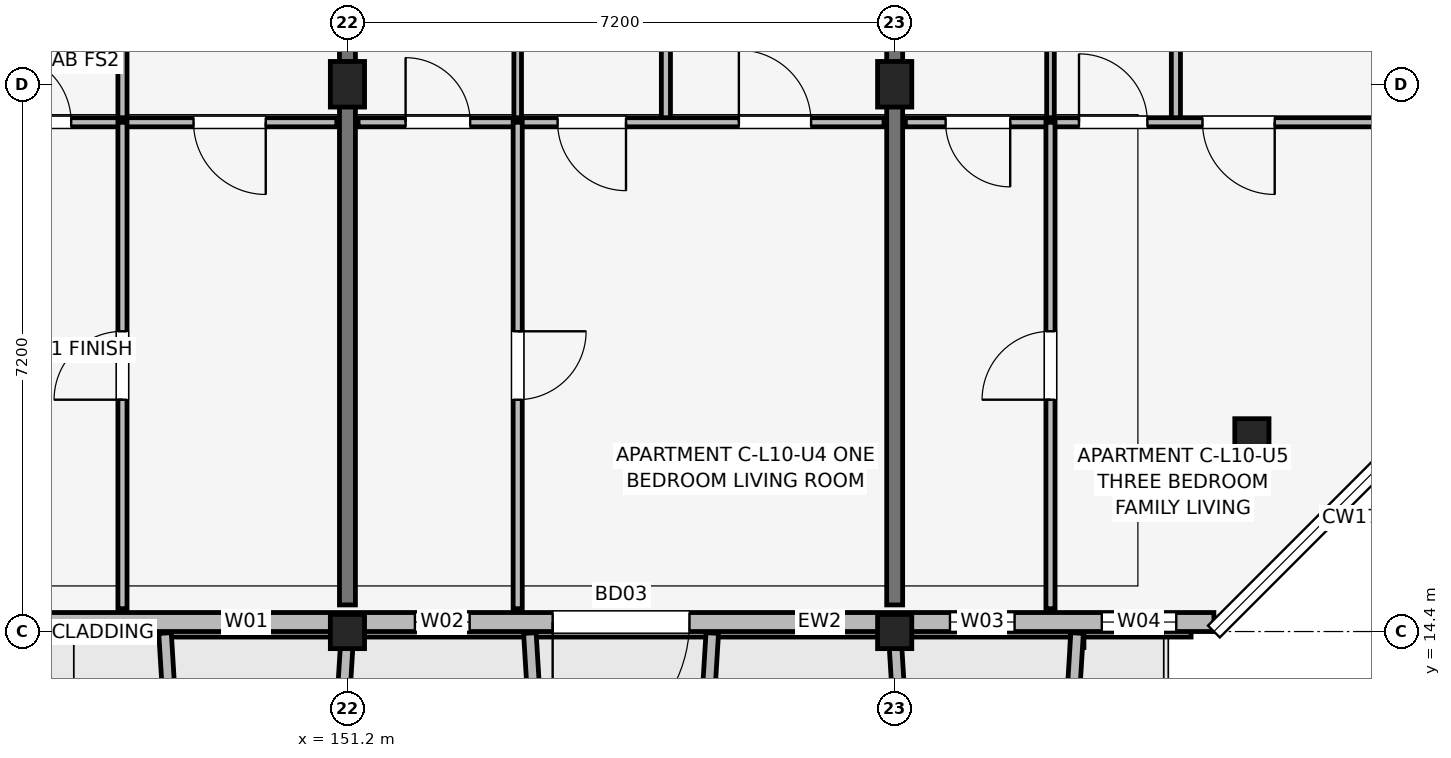
"""IFC4 building model, lengths in metres.
Left out: names, types, materials, properties, quantities, classifications, styles, units other than length and angle.
Written with IfcOpenShell. Run it as: python <this file> out.ifc"""

import sys

from ifc_helpers import new_model, si_unit, direction, frame, frame_2d, origin, origin_2d, place, context, subcontext, project, spatial, rectangle, extrude, element, fill, save


model = new_model("IFC4")
c1 = context("Model", 3, precision=1e-05, world=origin(), true_north=direction((0.0, 1.0)))
c2 = subcontext(c1, "Body", "Model", "MODEL_VIEW")
j1 = project(units=[si_unit("LENGTHUNIT", "METRE"), si_unit("PLANEANGLEUNIT", "RADIAN")], contexts=[c1])
p1 = place(None, origin())
s1 = spatial("IfcSite", under=j1, at=p1, CompositionType="ELEMENT")
p2 = place(p1, origin())
s2 = spatial("IfcBuilding", under=s1, at=p2, CompositionType="ELEMENT")
p3 = place(p2, frame((0.0, 0.0, 33.9)))
s3 = spatial("IfcBuildingStorey", under=s2, at=p3, CompositionType="ELEMENT", Elevation=33.9)
p4 = place(p3, frame((151.2, 14.4, 0.0), z_axis=(0.0, 0.0, 1.0), x_axis=(1.0, 0.0, 0.0)))
e1 = element("IfcColumn", 1, at=p4, inside=s3, PredefinedType="COLUMN", context=c2, shape_type="SweptSolid", body=[
    extrude(rectangle(XDim=0.45, YDim=0.45, at=origin_2d()), origin(), (0.0, 0.0, 1.0), 3.15),
])
p5 = place(p3, frame((151.2, 21.6, 0.0), z_axis=(0.0, 0.0, 1.0), x_axis=(1.0, 0.0, 0.0)))
e2 = element("IfcColumn", 2, at=p5, inside=s3, PredefinedType="COLUMN", context=c2, shape_type="SweptSolid", body=[
    extrude(rectangle(XDim=0.45, YDim=0.6, at=origin_2d()), origin(), (0.0, 0.0, 1.0), 3.15),
])
p6 = place(p3, frame((158.4, 14.4, 0.0), z_axis=(0.0, 0.0, 1.0), x_axis=(1.0, 0.0, 0.0)))
e3 = element("IfcColumn", 3, at=p6, inside=s3, PredefinedType="COLUMN", context=c2, shape_type="SweptSolid", body=[
    extrude(rectangle(XDim=0.45, YDim=0.45, at=origin_2d()), origin(), (0.0, 0.0, 1.0), 3.15),
])
for number, where, z_axis, x_axis in (
    (4, (158.4, 21.6, 0.0), (0.0, 0.0, 1.0), (1.0, 0.0, 0.0)),
    (5, (163.1, 16.9, 0.0), (0.0, 0.0, 1.0), (1.0, 0.0, 0.0)),
):
    element("IfcColumn", number, at=place(p3, frame(where, z_axis=z_axis, x_axis=x_axis)), inside=s3, PredefinedType="COLUMN", context=c2, shape_type="SweptSolid", body=[
        extrude(rectangle(XDim=0.45, YDim=0.6, at=origin_2d()), origin(), (0.0, 0.0, 1.0), 3.15),
    ])
for number, where, z_axis, x_axis in (
    (6, (151.2, 14.75, 0.0), (0.0, 0.0, 1.0), (0.0, 1.0, 0.0)),
    (7, (158.4, 14.75, 0.0), (0.0, 0.0, 1.0), (0.0, 1.0, 0.0)),
):
    element("IfcWall", number, at=place(p3, frame(where, z_axis=z_axis, x_axis=x_axis)), inside=s3, PredefinedType="SHEAR", context=c2, shape_type="SweptSolid", body=[
        extrude(rectangle(XDim=9.4, YDim=0.21, at=frame_2d((4.7, 0.0))), origin(), (0.0, 0.0, 1.0), 3.15),
    ])
p7 = place(p3, frame((132.6, 14.525, 0.0), z_axis=(0.0, 0.0, 1.0), x_axis=(1.0, 0.0, 0.0)))
e8 = element("IfcWall", 8, at=p7, inside=s3, PredefinedType="SOLIDWALL", context=c2, shape_type="SweptSolid", body=[
    extrude(rectangle(XDim=30.0, YDim=0.25, at=frame_2d((15.0, 0.0))), origin(), (0.0, 0.0, 1.0), 2.45),
])
p8 = place(p7, frame((8.55, 0.0, 0.0), z_axis=(0.0, 0.0, 1.0), x_axis=(-1.0, 0.0, 0.0)))
e9 = element("IfcOpeningElement", 9, at=p8, cuts=e8, PredefinedType="OPENING", context=c2, shape_type="SweptSolid", body=[
    extrude(rectangle(XDim=1.5, YDim=2.15, at=frame_2d((0.75, 1.075))), frame((0.0, 0.135, 0.0), z_axis=(0.0, -1.0, 0.0), x_axis=(1.0, 0.0, 0.0)), (0.0, 0.0, 1.0), 0.27),
])
p9 = place(p7, frame((23.1, 0.0, 0.0), z_axis=(0.0, 0.0, 1.0), x_axis=(-1.0, 0.0, 0.0)))
e10 = element("IfcOpeningElement", 10, at=p9, cuts=e8, PredefinedType="OPENING", context=c2, shape_type="SweptSolid", body=[
    extrude(rectangle(XDim=1.8, YDim=2.15, at=frame_2d((0.9, 1.075))), frame((0.0, 0.135, 0.0), z_axis=(0.0, -1.0, 0.0), x_axis=(1.0, 0.0, 0.0)), (0.0, 0.0, 1.0), 0.27),
])
p10 = place(p7, frame((2.567, 0.0, 0.75)))
e11 = element("IfcOpeningElement", 11, at=p10, cuts=e8, PredefinedType="OPENING", context=c2, shape_type="SweptSolid", body=[
    extrude(rectangle(XDim=1.22, YDim=1.5, at=frame_2d((0.61, 0.75))), frame((0.0, 0.135, 0.0), z_axis=(0.0, -1.0, 0.0), x_axis=(1.0, 0.0, 0.0)), (0.0, 0.0, 1.0), 0.27),
])
p11 = place(p7, frame((4.653, 0.0, 0.75)))
e12 = element("IfcOpeningElement", 12, at=p11, cuts=e8, PredefinedType="OPENING", context=c2, shape_type="SweptSolid", body=[
    extrude(rectangle(XDim=1.34, YDim=1.55, at=frame_2d((0.67, 0.775))), frame((0.0, 0.135, 0.0), z_axis=(0.0, -1.0, 0.0), x_axis=(1.0, 0.0, 0.0)), (0.0, 0.0, 1.0), 0.27),
])
p12 = place(p7, frame((11.873, 0.0, 0.7)))
e13 = element("IfcOpeningElement", 13, at=p12, cuts=e8, PredefinedType="OPENING", context=c2, shape_type="SweptSolid", body=[
    extrude(rectangle(XDim=1.72, YDim=1.6, at=frame_2d((0.86, 0.8))), frame((0.0, 0.135, 0.0), z_axis=(0.0, -1.0, 0.0), x_axis=(1.0, 0.0, 0.0)), (0.0, 0.0, 1.0), 0.27),
])
p13 = place(p7, frame((16.968, 0.0, 0.75)))
e14 = element("IfcOpeningElement", 14, at=p13, cuts=e8, PredefinedType="OPENING", context=c2, shape_type="SweptSolid", body=[
    extrude(rectangle(XDim=0.6, YDim=1.25, at=frame_2d((0.3, 0.625))), frame((0.0, 0.135, 0.0), z_axis=(0.0, -1.0, 0.0), x_axis=(1.0, 0.0, 0.0)), (0.0, 0.0, 1.0), 0.27),
])
p14 = place(p7, frame((19.488, 0.0, 0.75)))
e15 = element("IfcOpeningElement", 15, at=p14, cuts=e8, PredefinedType="OPENING", context=c2, shape_type="SweptSolid", body=[
    extrude(rectangle(XDim=0.72, YDim=1.35, at=frame_2d((0.36, 0.675))), frame((0.0, 0.135, 0.0), z_axis=(0.0, -1.0, 0.0), x_axis=(1.0, 0.0, 0.0)), (0.0, 0.0, 1.0), 0.27),
])
p15 = place(p7, frame((26.528, 0.0, 0.75)))
e16 = element("IfcOpeningElement", 16, at=p15, cuts=e8, PredefinedType="OPENING", context=c2, shape_type="SweptSolid", body=[
    extrude(rectangle(XDim=0.85, YDim=1.4, at=frame_2d((0.425, 0.7))), frame((0.0, 0.135, 0.0), z_axis=(0.0, -1.0, 0.0), x_axis=(1.0, 0.0, 0.0)), (0.0, 0.0, 1.0), 0.27),
])
p16 = place(p7, frame((28.525, 0.0, 0.75)))
e17 = element("IfcOpeningElement", 17, at=p16, cuts=e8, PredefinedType="OPENING", context=c2, shape_type="SweptSolid", body=[
    extrude(rectangle(XDim=0.98, YDim=1.45, at=frame_2d((0.49, 0.725))), frame((0.0, 0.135, 0.0), z_axis=(0.0, -1.0, 0.0), x_axis=(1.0, 0.0, 0.0)), (0.0, 0.0, 1.0), 0.27),
])
for number, where, z_axis, x_axis in (
    (18, (148.8, 14.38, 0.0), (0.0, 0.0, 1.0), (0.061, -0.998, 0.0)),
    (19, (151.2, 14.38, 0.0), (0.0, 0.0, 1.0), (-0.061, -0.998, 0.0)),
):
    element("IfcWall", number, at=place(p3, frame(where, z_axis=z_axis, x_axis=x_axis)), inside=s3, PredefinedType="ELEMENTEDWALL", context=c2, shape_type="SweptSolid", body=[
        extrude(rectangle(XDim=1.964, YDim=0.165, at=frame_2d((0.982, 0.0))), origin(), (0.0, 0.0, 1.0), 2.58),
    ])
for number, where, z_axis, x_axis in (
    (20, (153.6, 14.38, 0.0), (0.0, 0.0, 1.0), (0.061, -0.998, 0.0)),
    (21, (156.0, 14.38, 0.0), (0.0, 0.0, 1.0), (-0.061, -0.998, 0.0)),
):
    element("IfcWall", number, at=place(p3, frame(where, z_axis=z_axis, x_axis=x_axis)), inside=s3, PredefinedType="ELEMENTEDWALL", context=c2, shape_type="SweptSolid", body=[
        extrude(rectangle(XDim=1.964, YDim=0.165, at=frame_2d((0.982, 0.0))), origin(), (0.0, 0.0, 1.0), 2.45),
    ])
for number, where, z_axis, x_axis in (
    (22, (158.4, 14.38, 0.0), (0.0, 0.0, 1.0), (0.061, -0.998, 0.0)),
    (23, (160.8, 14.38, 0.0), (0.0, 0.0, 1.0), (-0.061, -0.998, 0.0)),
):
    element("IfcWall", number, at=place(p3, frame(where, z_axis=z_axis, x_axis=x_axis)), inside=s3, PredefinedType="ELEMENTEDWALL", context=c2, shape_type="SweptSolid", body=[
        extrude(rectangle(XDim=1.964, YDim=0.165, at=frame_2d((0.982, 0.0))), origin(), (0.0, 0.0, 1.0), 2.95),
    ])
p17 = place(p3, frame((148.24, 21.1, 0.0), z_axis=(0.0, 0.0, 1.0), x_axis=(0.0, 1.0, 0.0)))
e24 = element("IfcWall", 24, at=p17, inside=s3, PredefinedType="PARTITIONING", context=c2, shape_type="SweptSolid", body=[
    extrude(rectangle(XDim=3.2, YDim=0.12, at=frame_2d((1.6, 0.0))), origin(), (0.0, 0.0, 1.0), 2.38),
])
p18 = place(p3, frame((144.14, 21.1, 0.0), z_axis=(0.0, 0.0, 1.0), x_axis=(1.0, 0.0, 0.0)))
e25 = element("IfcWall", 25, at=p18, inside=s3, PredefinedType="PARTITIONING", context=c2, shape_type="SweptSolid", body=[
    extrude(rectangle(XDim=6.92, YDim=0.12, at=frame_2d((3.46, 0.0))), origin(), (0.0, 0.0, 1.0), 2.38),
])
p19 = place(p18, frame((1.35, 0.0, 0.0), z_axis=(0.0, 0.0, 1.0), x_axis=(-1.0, 0.0, 0.0)))
e26 = element("IfcOpeningElement", 26, at=p19, cuts=e25, PredefinedType="OPENING", context=c2, shape_type="SweptSolid", body=[
    extrude(rectangle(XDim=0.85, YDim=2.08, at=frame_2d((0.425, 1.04))), frame((0.0, 0.07, 0.0), z_axis=(0.0, -1.0, 0.0), x_axis=(1.0, 0.0, 0.0)), (0.0, 0.0, 1.0), 0.14),
])
p20 = place(p18, frame((2.525, 0.0, 0.0)))
e27 = element("IfcOpeningElement", 27, at=p20, cuts=e25, PredefinedType="OPENING", context=c2, shape_type="SweptSolid", body=[
    extrude(rectangle(XDim=0.9, YDim=2.08, at=frame_2d((0.45, 1.04))), frame((0.0, 0.07, 0.0), z_axis=(0.0, -1.0, 0.0), x_axis=(1.0, 0.0, 0.0)), (0.0, 0.0, 1.0), 0.14),
])
p21 = place(p18, frame((5.985, 0.0, 0.0), z_axis=(0.0, 0.0, 1.0), x_axis=(-1.0, 0.0, 0.0)))
e28 = element("IfcOpeningElement", 28, at=p21, cuts=e25, PredefinedType="OPENING", context=c2, shape_type="SweptSolid", body=[
    extrude(rectangle(XDim=0.95, YDim=2.08, at=frame_2d((0.475, 1.04))), frame((0.0, 0.07, 0.0), z_axis=(0.0, -1.0, 0.0), x_axis=(1.0, 0.0, 0.0)), (0.0, 0.0, 1.0), 0.14),
])
p22 = place(p3, frame((148.24, 14.7, 0.0), z_axis=(0.0, 0.0, 1.0), x_axis=(0.0, 1.0, 0.0)))
e29 = element("IfcWall", 29, at=p22, inside=s3, PredefinedType="PARTITIONING", context=c2, shape_type="SweptSolid", body=[
    extrude(rectangle(XDim=6.4, YDim=0.12, at=frame_2d((3.2, 0.0))), origin(), (0.0, 0.0, 1.0), 2.38),
])
p23 = place(p22, frame((2.75, 0.0, 0.0)))
e30 = element("IfcOpeningElement", 30, at=p23, cuts=e29, PredefinedType="OPENING", context=c2, shape_type="SweptSolid", body=[
    extrude(rectangle(XDim=0.9, YDim=2.08, at=frame_2d((0.45, 1.04))), frame((0.0, 0.07, 0.0), z_axis=(0.0, -1.0, 0.0), x_axis=(1.0, 0.0, 0.0)), (0.0, 0.0, 1.0), 0.14),
])
p24 = place(p3, frame((153.44, 21.1, 0.0), z_axis=(0.0, 0.0, 1.0), x_axis=(0.0, 1.0, 0.0)))
e31 = element("IfcWall", 31, at=p24, inside=s3, PredefinedType="PARTITIONING", context=c2, shape_type="SweptSolid", body=[
    extrude(rectangle(XDim=3.2, YDim=0.1, at=frame_2d((1.6, 0.0))), origin(), (0.0, 0.0, 1.0), 2.38),
])
p25 = place(p3, frame((155.39, 21.1, 0.0), z_axis=(0.0, 0.0, 1.0), x_axis=(0.0, 1.0, 0.0)))
e32 = element("IfcWall", 32, at=p25, inside=s3, PredefinedType="PARTITIONING", context=c2, shape_type="SweptSolid", body=[
    extrude(rectangle(XDim=3.2, YDim=0.12, at=frame_2d((1.6, 0.0))), origin(), (0.0, 0.0, 1.0), 2.38),
])
p26 = place(p3, frame((151.34, 21.1, 0.0), z_axis=(0.0, 0.0, 1.0), x_axis=(1.0, 0.0, 0.0)))
e33 = element("IfcWall", 33, at=p26, inside=s3, PredefinedType="PARTITIONING", context=c2, shape_type="SweptSolid", body=[
    extrude(rectangle(XDim=6.92, YDim=0.12, at=frame_2d((3.46, 0.0))), origin(), (0.0, 0.0, 1.0), 2.38),
])
p27 = place(p26, frame((0.625, 0.0, 0.0)))
e34 = element("IfcOpeningElement", 34, at=p27, cuts=e33, PredefinedType="OPENING", context=c2, shape_type="SweptSolid", body=[
    extrude(rectangle(XDim=0.85, YDim=2.08, at=frame_2d((0.425, 1.04))), frame((0.0, 0.07, 0.0), z_axis=(0.0, -1.0, 0.0), x_axis=(1.0, 0.0, 0.0)), (0.0, 0.0, 1.0), 0.14),
])
p28 = place(p26, frame((3.525, 0.0, 0.0), z_axis=(0.0, 0.0, 1.0), x_axis=(-1.0, 0.0, 0.0)))
e35 = element("IfcOpeningElement", 35, at=p28, cuts=e33, PredefinedType="OPENING", context=c2, shape_type="SweptSolid", body=[
    extrude(rectangle(XDim=0.9, YDim=2.08, at=frame_2d((0.45, 1.04))), frame((0.0, 0.07, 0.0), z_axis=(0.0, -1.0, 0.0), x_axis=(1.0, 0.0, 0.0)), (0.0, 0.0, 1.0), 0.14),
])
p29 = place(p26, frame((5.01, 0.0, 0.0)))
e36 = element("IfcOpeningElement", 36, at=p29, cuts=e33, PredefinedType="OPENING", context=c2, shape_type="SweptSolid", body=[
    extrude(rectangle(XDim=0.95, YDim=2.08, at=frame_2d((0.475, 1.04))), frame((0.0, 0.07, 0.0), z_axis=(0.0, -1.0, 0.0), x_axis=(1.0, 0.0, 0.0)), (0.0, 0.0, 1.0), 0.14),
])
p30 = place(p3, frame((153.44, 14.7, 0.0), z_axis=(0.0, 0.0, 1.0), x_axis=(0.0, 1.0, 0.0)))
e37 = element("IfcWall", 37, at=p30, inside=s3, PredefinedType="PARTITIONING", context=c2, shape_type="SweptSolid", body=[
    extrude(rectangle(XDim=6.4, YDim=0.12, at=frame_2d((3.2, 0.0))), origin(), (0.0, 0.0, 1.0), 2.38),
])
p31 = place(p30, frame((3.65, 0.0, 0.0), z_axis=(0.0, 0.0, 1.0), x_axis=(-1.0, 0.0, 0.0)))
e38 = element("IfcOpeningElement", 38, at=p31, cuts=e37, PredefinedType="OPENING", context=c2, shape_type="SweptSolid", body=[
    extrude(rectangle(XDim=0.9, YDim=2.08, at=frame_2d((0.45, 1.04))), frame((0.0, 0.07, 0.0), z_axis=(0.0, -1.0, 0.0), x_axis=(1.0, 0.0, 0.0)), (0.0, 0.0, 1.0), 0.14),
])
p32 = place(p3, frame((160.45, 21.1, 0.0), z_axis=(0.0, 0.0, 1.0), x_axis=(0.0, 1.0, 0.0)))
e39 = element("IfcWall", 39, at=p32, inside=s3, PredefinedType="PARTITIONING", context=c2, shape_type="SweptSolid", body=[
    extrude(rectangle(XDim=3.2, YDim=0.1, at=frame_2d((1.6, 0.0))), origin(), (0.0, 0.0, 1.0), 2.38),
])
p33 = place(p3, frame((162.1, 21.1, 0.0), z_axis=(0.0, 0.0, 1.0), x_axis=(0.0, 1.0, 0.0)))
e40 = element("IfcWall", 40, at=p33, inside=s3, PredefinedType="PARTITIONING", context=c2, shape_type="SweptSolid", body=[
    extrude(rectangle(XDim=3.2, YDim=0.12, at=frame_2d((1.6, 0.0))), origin(), (0.0, 0.0, 1.0), 2.38),
])
p34 = place(p3, frame((158.54, 21.1, 0.0), z_axis=(0.0, 0.0, 1.0), x_axis=(1.0, 0.0, 0.0)))
e41 = element("IfcWall", 41, at=p34, inside=s3, PredefinedType="PARTITIONING", context=c2, shape_type="SweptSolid", body=[
    extrude(rectangle(XDim=6.92, YDim=0.12, at=frame_2d((3.46, 0.0))), origin(), (0.0, 0.0, 1.0), 2.38),
])
p35 = place(p34, frame((1.38, 0.0, 0.0), z_axis=(0.0, 0.0, 1.0), x_axis=(-1.0, 0.0, 0.0)))
e42 = element("IfcOpeningElement", 42, at=p35, cuts=e41, PredefinedType="OPENING", context=c2, shape_type="SweptSolid", body=[
    extrude(rectangle(XDim=0.85, YDim=2.08, at=frame_2d((0.425, 1.04))), frame((0.0, 0.07, 0.0), z_axis=(0.0, -1.0, 0.0), x_axis=(1.0, 0.0, 0.0)), (0.0, 0.0, 1.0), 0.14),
])
p36 = place(p34, frame((2.285, 0.0, 0.0)))
e43 = element("IfcOpeningElement", 43, at=p36, cuts=e41, PredefinedType="OPENING", context=c2, shape_type="SweptSolid", body=[
    extrude(rectangle(XDim=0.9, YDim=2.08, at=frame_2d((0.45, 1.04))), frame((0.0, 0.07, 0.0), z_axis=(0.0, -1.0, 0.0), x_axis=(1.0, 0.0, 0.0)), (0.0, 0.0, 1.0), 0.14),
])
p37 = place(p34, frame((4.86, 0.0, 0.0), z_axis=(0.0, 0.0, 1.0), x_axis=(-1.0, 0.0, 0.0)))
e44 = element("IfcOpeningElement", 44, at=p37, cuts=e41, PredefinedType="OPENING", context=c2, shape_type="SweptSolid", body=[
    extrude(rectangle(XDim=0.95, YDim=2.08, at=frame_2d((0.475, 1.04))), frame((0.0, 0.07, 0.0), z_axis=(0.0, -1.0, 0.0), x_axis=(1.0, 0.0, 0.0)), (0.0, 0.0, 1.0), 0.14),
])
p38 = place(p3, frame((160.45, 14.7, 0.0), z_axis=(0.0, 0.0, 1.0), x_axis=(0.0, 1.0, 0.0)))
e45 = element("IfcWall", 45, at=p38, inside=s3, PredefinedType="PARTITIONING", context=c2, shape_type="SweptSolid", body=[
    extrude(rectangle(XDim=6.4, YDim=0.12, at=frame_2d((3.2, 0.0))), origin(), (0.0, 0.0, 1.0), 2.38),
])
p39 = place(p38, frame((2.75, 0.0, 0.0)))
e46 = element("IfcOpeningElement", 46, at=p39, cuts=e45, PredefinedType="OPENING", context=c2, shape_type="SweptSolid", body=[
    extrude(rectangle(XDim=0.9, YDim=2.08, at=frame_2d((0.45, 1.04))), frame((0.0, 0.07, 0.0), z_axis=(0.0, -1.0, 0.0), x_axis=(1.0, 0.0, 0.0)), (0.0, 0.0, 1.0), 0.14),
])
p40 = place(p9, origin())
e47 = element("IfcDoor", 47, at=p40, inside=s3, OperationType="SINGLE_SWING_LEFT", PredefinedType="DOOR", context=c2, shape_type="SweptSolid", body=[
    extrude(rectangle(XDim=1.8, YDim=2.15, at=frame_2d((0.9, 1.075))), frame((0.0, 0.025, 0.0), z_axis=(0.0, -1.0, 0.0), x_axis=(1.0, 0.0, 0.0)), (0.0, 0.0, 1.0), 0.05),
])
fill(e10, e47)
p41 = place(p13, origin())
e48 = element("IfcWindow", 48, at=p41, inside=s3, PartitioningType="SINGLE_PANEL", PredefinedType="WINDOW", context=c2, shape_type="SweptSolid", body=[
    extrude(rectangle(XDim=0.6, YDim=1.25, at=frame_2d((0.3, 0.625))), frame((0.0, 0.03, 0.0), z_axis=(0.0, -1.0, 0.0), x_axis=(1.0, 0.0, 0.0)), (0.0, 0.0, 1.0), 0.06),
])
fill(e14, e48)
p42 = place(p14, origin())
e49 = element("IfcWindow", 49, at=p42, inside=s3, PartitioningType="SINGLE_PANEL", PredefinedType="WINDOW", context=c2, shape_type="SweptSolid", body=[
    extrude(rectangle(XDim=0.72, YDim=1.35, at=frame_2d((0.36, 0.675))), frame((0.0, 0.03, 0.0), z_axis=(0.0, -1.0, 0.0), x_axis=(1.0, 0.0, 0.0)), (0.0, 0.0, 1.0), 0.06),
])
fill(e15, e49)
p43 = place(p15, origin())
e50 = element("IfcWindow", 50, at=p43, inside=s3, PartitioningType="SINGLE_PANEL", PredefinedType="WINDOW", context=c2, shape_type="SweptSolid", body=[
    extrude(rectangle(XDim=0.85, YDim=1.4, at=frame_2d((0.425, 0.7))), frame((0.0, 0.03, 0.0), z_axis=(0.0, -1.0, 0.0), x_axis=(1.0, 0.0, 0.0)), (0.0, 0.0, 1.0), 0.06),
])
fill(e16, e50)
p44 = place(p16, origin())
e51 = element("IfcWindow", 51, at=p44, inside=s3, PartitioningType="SINGLE_PANEL", PredefinedType="WINDOW", context=c2, shape_type="SweptSolid", body=[
    extrude(rectangle(XDim=0.98, YDim=1.45, at=frame_2d((0.49, 0.725))), frame((0.0, 0.03, 0.0), z_axis=(0.0, -1.0, 0.0), x_axis=(1.0, 0.0, 0.0)), (0.0, 0.0, 1.0), 0.06),
])
fill(e17, e51)
p45 = place(p20, origin())
e52 = element("IfcDoor", 52, at=p45, inside=s3, OperationType="SINGLE_SWING_LEFT", PredefinedType="DOOR", context=c2, shape_type="SweptSolid", body=[
    extrude(rectangle(XDim=0.9, YDim=2.08, at=frame_2d((0.45, 1.04))), frame((0.0, 0.025, 0.0), z_axis=(0.0, -1.0, 0.0), x_axis=(1.0, 0.0, 0.0)), (0.0, 0.0, 1.0), 0.05),
])
fill(e27, e52)
p46 = place(p21, origin())
e53 = element("IfcDoor", 53, at=p46, inside=s3, OperationType="SINGLE_SWING_RIGHT", PredefinedType="DOOR", context=c2, shape_type="SweptSolid", body=[
    extrude(rectangle(XDim=0.95, YDim=2.08, at=frame_2d((0.475, 1.04))), frame((0.0, 0.025, 0.0), z_axis=(0.0, -1.0, 0.0), x_axis=(1.0, 0.0, 0.0)), (0.0, 0.0, 1.0), 0.05),
])
fill(e28, e53)
p47 = place(p23, origin())
e54 = element("IfcDoor", 54, at=p47, inside=s3, OperationType="SINGLE_SWING_LEFT", PredefinedType="DOOR", context=c2, shape_type="SweptSolid", body=[
    extrude(rectangle(XDim=0.9, YDim=2.08, at=frame_2d((0.45, 1.04))), frame((0.0, 0.025, 0.0), z_axis=(0.0, -1.0, 0.0), x_axis=(1.0, 0.0, 0.0)), (0.0, 0.0, 1.0), 0.05),
])
fill(e30, e54)
p48 = place(p27, origin())
e55 = element("IfcDoor", 55, at=p48, inside=s3, OperationType="SINGLE_SWING_LEFT", PredefinedType="DOOR", context=c2, shape_type="SweptSolid", body=[
    extrude(rectangle(XDim=0.85, YDim=2.08, at=frame_2d((0.425, 1.04))), frame((0.0, 0.025, 0.0), z_axis=(0.0, -1.0, 0.0), x_axis=(1.0, 0.0, 0.0)), (0.0, 0.0, 1.0), 0.05),
])
fill(e34, e55)
p49 = place(p28, origin())
e56 = element("IfcDoor", 56, at=p49, inside=s3, OperationType="SINGLE_SWING_RIGHT", PredefinedType="DOOR", context=c2, shape_type="SweptSolid", body=[
    extrude(rectangle(XDim=0.9, YDim=2.08, at=frame_2d((0.45, 1.04))), frame((0.0, 0.025, 0.0), z_axis=(0.0, -1.0, 0.0), x_axis=(1.0, 0.0, 0.0)), (0.0, 0.0, 1.0), 0.05),
])
fill(e35, e56)
p50 = place(p29, origin())
e57 = element("IfcDoor", 57, at=p50, inside=s3, OperationType="SINGLE_SWING_LEFT", PredefinedType="DOOR", context=c2, shape_type="SweptSolid", body=[
    extrude(rectangle(XDim=0.95, YDim=2.08, at=frame_2d((0.475, 1.04))), frame((0.0, 0.025, 0.0), z_axis=(0.0, -1.0, 0.0), x_axis=(1.0, 0.0, 0.0)), (0.0, 0.0, 1.0), 0.05),
])
fill(e36, e57)
p51 = place(p31, origin())
e58 = element("IfcDoor", 58, at=p51, inside=s3, OperationType="SINGLE_SWING_RIGHT", PredefinedType="DOOR", context=c2, shape_type="SweptSolid", body=[
    extrude(rectangle(XDim=0.9, YDim=2.08, at=frame_2d((0.45, 1.04))), frame((0.0, 0.025, 0.0), z_axis=(0.0, -1.0, 0.0), x_axis=(1.0, 0.0, 0.0)), (0.0, 0.0, 1.0), 0.05),
])
fill(e38, e58)
p52 = place(p35, origin())
e59 = element("IfcDoor", 59, at=p52, inside=s3, OperationType="SINGLE_SWING_RIGHT", PredefinedType="DOOR", context=c2, shape_type="SweptSolid", body=[
    extrude(rectangle(XDim=0.85, YDim=2.08, at=frame_2d((0.425, 1.04))), frame((0.0, 0.025, 0.0), z_axis=(0.0, -1.0, 0.0), x_axis=(1.0, 0.0, 0.0)), (0.0, 0.0, 1.0), 0.05),
])
fill(e42, e59)
p53 = place(p36, origin())
e60 = element("IfcDoor", 60, at=p53, inside=s3, OperationType="SINGLE_SWING_LEFT", PredefinedType="DOOR", context=c2, shape_type="SweptSolid", body=[
    extrude(rectangle(XDim=0.9, YDim=2.08, at=frame_2d((0.45, 1.04))), frame((0.0, 0.025, 0.0), z_axis=(0.0, -1.0, 0.0), x_axis=(1.0, 0.0, 0.0)), (0.0, 0.0, 1.0), 0.05),
])
fill(e43, e60)
p54 = place(p37, origin())
e61 = element("IfcDoor", 61, at=p54, inside=s3, OperationType="SINGLE_SWING_RIGHT", PredefinedType="DOOR", context=c2, shape_type="SweptSolid", body=[
    extrude(rectangle(XDim=0.95, YDim=2.08, at=frame_2d((0.475, 1.04))), frame((0.0, 0.025, 0.0), z_axis=(0.0, -1.0, 0.0), x_axis=(1.0, 0.0, 0.0)), (0.0, 0.0, 1.0), 0.05),
])
fill(e44, e61)
p55 = place(p39, origin())
e62 = element("IfcDoor", 62, at=p55, inside=s3, OperationType="SINGLE_SWING_LEFT", PredefinedType="DOOR", context=c2, shape_type="SweptSolid", body=[
    extrude(rectangle(XDim=0.9, YDim=2.08, at=frame_2d((0.45, 1.04))), frame((0.0, 0.025, 0.0), z_axis=(0.0, -1.0, 0.0), x_axis=(1.0, 0.0, 0.0)), (0.0, 0.0, 1.0), 0.05),
])
fill(e46, e62)
save(model, sys.argv[1])
